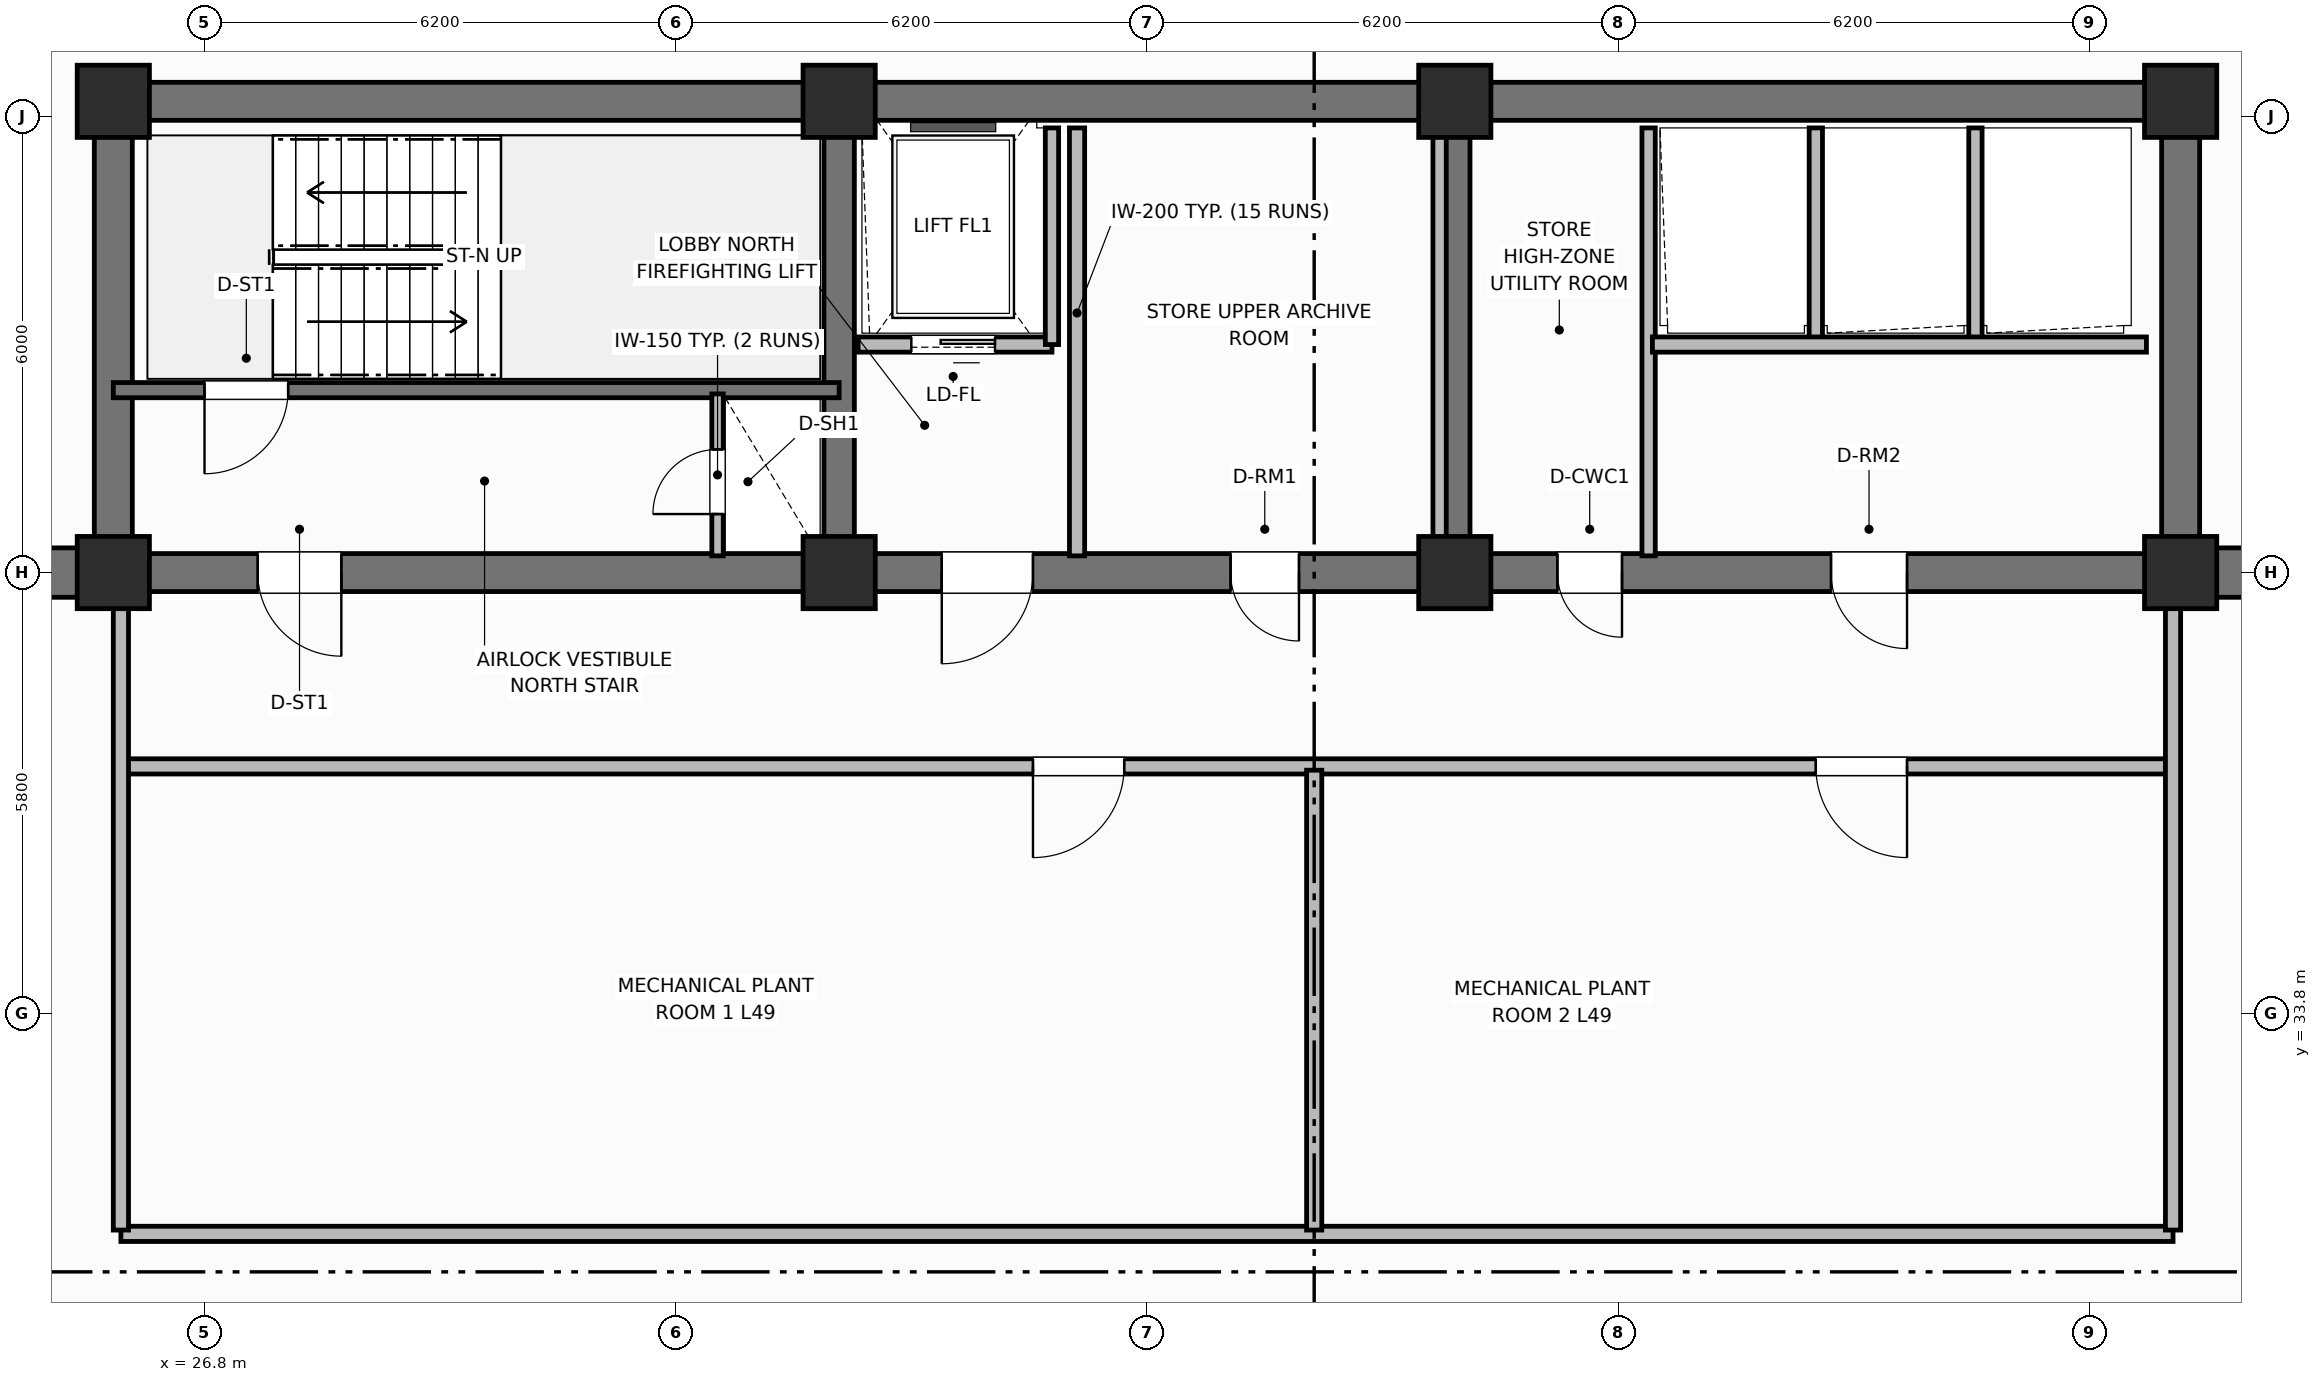
"""IFC4 building model, lengths in metres.
Left out: names, types, materials, properties, quantities, classifications, styles, units other than length and angle.
Written with IfcOpenShell. Run it as: python <this file> out.ifc"""

import sys

from ifc_helpers import new_model, si_unit, direction, frame, frame_2d, origin, origin_2d, place, context, subcontext, project, spatial, rectangle, extrude, element, fill, save


model = new_model("IFC4")
c1 = context("Model", 3, precision=1e-05, world=origin(), true_north=direction((0.0, 1.0)))
c2 = subcontext(c1, "Body", "Model", "MODEL_VIEW")
j1 = project(units=[si_unit("LENGTHUNIT", "METRE"), si_unit("PLANEANGLEUNIT", "RADIAN")], contexts=[c1])
p1 = place(None, origin())
s1 = spatial("IfcSite", under=j1, at=p1, CompositionType="ELEMENT")
p2 = place(p1, origin())
s2 = spatial("IfcBuilding", under=s1, at=p2, CompositionType="ELEMENT")
p3 = place(p2, frame((0.0, 0.0, 195.9)))
s3 = spatial("IfcBuildingStorey", under=s2, at=p3, CompositionType="ELEMENT", Elevation=195.9)
p4 = place(p3, frame((25.6, 45.8, 0.0), z_axis=(0.0, 0.0, 1.0), x_axis=(1.0, 0.0, 0.0)))
e1 = element("IfcWall", 1, at=p4, inside=s3, PredefinedType="SHEAR", context=c2, shape_type="SweptSolid", body=[
    extrude(rectangle(XDim=27.2, YDim=0.5, at=frame_2d((13.6, 0.0))), origin(), (0.0, 0.0, 1.0), 7.2),
])
for number, where, z_axis, x_axis in (
    (2, (25.6, 39.85, 0.0), (0.0, 0.0, 1.0), (0.0, 1.0, 0.0)),
    (3, (52.8, 39.85, 0.0), (0.0, 0.0, 1.0), (0.0, 1.0, 0.0)),
):
    element("IfcWall", number, at=place(p3, frame(where, z_axis=z_axis, x_axis=x_axis)), inside=s3, PredefinedType="SHEAR", context=c2, shape_type="SweptSolid", body=[
        extrude(rectangle(XDim=5.7, YDim=0.5, at=frame_2d((2.85, 0.0))), origin(), (0.0, 0.0, 1.0), 7.2),
    ])
p5 = place(p3, frame((52.8, 39.6, 0.0), z_axis=(0.0, 0.0, 1.0), x_axis=(-1.0, 0.0, 0.0)))
e4 = element("IfcWall", 4, at=p5, inside=s3, PredefinedType="SHEAR", context=c2, shape_type="SweptSolid", body=[
    extrude(rectangle(XDim=27.2, YDim=0.5, at=frame_2d((13.6, 0.0))), origin(), (0.0, 0.0, 1.0), 7.2),
])
p6 = place(p5, frame((24.2, 0.0, 0.0)))
e5 = element("IfcOpeningElement", 5, at=p6, cuts=e4, PredefinedType="OPENING", context=c2, shape_type="SweptSolid", body=[
    extrude(rectangle(XDim=1.1, YDim=2.15, at=frame_2d((0.55, 1.075))), frame((0.0, 0.26, 0.0), z_axis=(0.0, -1.0, 0.0), x_axis=(1.0, 0.0, 0.0)), (0.0, 0.0, 1.0), 0.52),
])
p7 = place(p5, frame((15.1, 0.0, 0.0)))
e6 = element("IfcOpeningElement", 6, at=p7, cuts=e4, PredefinedType="OPENING", context=c2, shape_type="SweptSolid", body=[
    extrude(rectangle(XDim=1.2, YDim=2.15, at=frame_2d((0.6, 1.075))), frame((0.0, 0.26, 0.0), z_axis=(0.0, -1.0, 0.0), x_axis=(1.0, 0.0, 0.0)), (0.0, 0.0, 1.0), 0.52),
])
p8 = place(p5, frame((11.6, 0.0, 0.0)))
e7 = element("IfcOpeningElement", 7, at=p8, cuts=e4, PredefinedType="OPENING", context=c2, shape_type="SweptSolid", body=[
    extrude(rectangle(XDim=0.9, YDim=2.1, at=frame_2d((0.45, 1.05))), frame((0.0, 0.26, 0.0), z_axis=(0.0, -1.0, 0.0), x_axis=(1.0, 0.0, 0.0)), (0.0, 0.0, 1.0), 0.52),
])
p9 = place(p5, frame((7.35, 0.0, 0.0)))
e8 = element("IfcOpeningElement", 8, at=p9, cuts=e4, PredefinedType="OPENING", context=c2, shape_type="SweptSolid", body=[
    extrude(rectangle(XDim=0.85, YDim=2.1, at=frame_2d((0.425, 1.05))), frame((0.0, 0.26, 0.0), z_axis=(0.0, -1.0, 0.0), x_axis=(1.0, 0.0, 0.0)), (0.0, 0.0, 1.0), 0.52),
])
p10 = place(p5, frame((3.6, 0.0, 0.0)))
e9 = element("IfcOpeningElement", 9, at=p10, cuts=e4, PredefinedType="OPENING", context=c2, shape_type="SweptSolid", body=[
    extrude(rectangle(XDim=1.0, YDim=2.15, at=frame_2d((0.5, 1.075))), frame((0.0, 0.26, 0.0), z_axis=(0.0, -1.0, 0.0), x_axis=(1.0, 0.0, 0.0)), (0.0, 0.0, 1.0), 0.52),
])
for number, where, z_axis, x_axis in (
    (10, (35.15, 39.85, 0.0), (0.0, 0.0, 1.0), (0.0, 1.0, 0.0)),
    (11, (43.25, 39.85, 0.0), (0.0, 0.0, 1.0), (0.0, 1.0, 0.0)),
):
    element("IfcWall", number, at=place(p3, frame(where, z_axis=z_axis, x_axis=x_axis)), inside=s3, PredefinedType="SHEAR", context=c2, shape_type="SweptSolid", body=[
        extrude(rectangle(XDim=5.7, YDim=0.4, at=frame_2d((2.85, 0.0))), origin(), (0.0, 0.0, 1.0), 7.2),
    ])
for number, where, z_axis, x_axis in (
    (12, (25.6, 39.6, 0.0), (0.0, 0.0, 1.0), (1.0, 0.0, 0.0)),
    (13, (25.6, 45.8, 0.0), (0.0, 0.0, 1.0), (1.0, 0.0, 0.0)),
    (14, (35.15, 39.6, 0.0), (0.0, 0.0, 1.0), (1.0, 0.0, 0.0)),
    (15, (35.15, 45.8, 0.0), (0.0, 0.0, 1.0), (1.0, 0.0, 0.0)),
    (16, (43.25, 39.6, 0.0), (0.0, 0.0, 1.0), (1.0, 0.0, 0.0)),
    (17, (43.25, 45.8, 0.0), (0.0, 0.0, 1.0), (1.0, 0.0, 0.0)),
    (18, (52.8, 39.6, 0.0), (0.0, 0.0, 1.0), (1.0, 0.0, 0.0)),
    (19, (52.8, 45.8, 0.0), (0.0, 0.0, 1.0), (1.0, 0.0, 0.0)),
):
    element("IfcColumn", number, at=place(p3, frame(where, z_axis=z_axis, x_axis=x_axis)), inside=s3, PredefinedType="COLUMN", context=c2, shape_type="SweptSolid", body=[
        extrude(rectangle(XDim=0.95, YDim=0.95, at=origin_2d()), origin(), (0.0, 0.0, 1.0), 7.2),
    ])
for number, where, z_axis, x_axis in (
    (20, (17.05, 39.6, 0.0), (0.0, 0.0, 1.0), (1.0, 0.0, 0.0)),
    (21, (52.8, 39.6, 0.0), (0.0, 0.0, 1.0), (1.0, 0.0, 0.0)),
):
    element("IfcWall", number, at=place(p3, frame(where, z_axis=z_axis, x_axis=x_axis)), inside=s3, PredefinedType="SHEAR", context=c2, shape_type="SweptSolid", body=[
        extrude(rectangle(XDim=8.55, YDim=0.65, at=frame_2d((4.275, 0.0))), origin(), (0.0, 0.0, 1.0), 6.94),
    ])
p11 = place(p3, frame((35.15, 42.0, 0.0), z_axis=(0.0, 0.0, 1.0), x_axis=(-1.0, 0.0, 0.0)))
e22 = element("IfcWall", 22, at=p11, inside=s3, PredefinedType="SHEAR", context=c2, shape_type="SweptSolid", body=[
    extrude(rectangle(XDim=9.55, YDim=0.2, at=frame_2d((4.775, 0.0))), origin(), (0.0, 0.0, 1.0), 7.2),
])
p12 = place(p11, frame((7.25, 0.0, 0.0)))
e23 = element("IfcOpeningElement", 23, at=p12, cuts=e22, PredefinedType="OPENING", context=c2, shape_type="SweptSolid", body=[
    extrude(rectangle(XDim=1.1, YDim=2.15, at=frame_2d((0.55, 1.075))), frame((0.0, 0.11, 0.0), z_axis=(0.0, -1.0, 0.0), x_axis=(1.0, 0.0, 0.0)), (0.0, 0.0, 1.0), 0.22),
])
p13 = place(p3, frame((33.55, 39.82, 0.0), z_axis=(0.0, 0.0, 1.0), x_axis=(0.0, 1.0, 0.0)))
e24 = element("IfcWall", 24, at=p13, inside=s3, PredefinedType="PARTITIONING", context=c2, shape_type="SweptSolid", body=[
    extrude(rectangle(XDim=2.13, YDim=0.15, at=frame_2d((1.065, 0.0))), origin(), (0.0, 0.0, 1.0), 6.0),
])
p14 = place(p13, frame((0.55, 0.0, 0.0)))
e25 = element("IfcOpeningElement", 25, at=p14, cuts=e24, PredefinedType="OPENING", context=c2, shape_type="SweptSolid", body=[
    extrude(rectangle(XDim=0.85, YDim=2.05, at=frame_2d((0.425, 1.025))), frame((0.0, 0.085, 0.0), z_axis=(0.0, -1.0, 0.0), x_axis=(1.0, 0.0, 0.0)), (0.0, 0.0, 1.0), 0.17),
])
p15 = place(p3, frame((37.95, 42.6, 0.0), z_axis=(0.0, 0.0, 1.0), x_axis=(-1.0, 0.0, 0.0)))
e26 = element("IfcWall", 26, at=p15, inside=s3, PredefinedType="PARTITIONING", context=c2, shape_type="SweptSolid", body=[
    extrude(rectangle(XDim=2.55, YDim=0.2, at=frame_2d((1.275, 0.0))), origin(), (0.0, 0.0, 1.0), 5.82),
])
p16 = place(p15, frame((0.75, 0.0, 0.0)))
e27 = element("IfcOpeningElement", 27, at=p16, cuts=e26, PredefinedType="OPENING", context=c2, shape_type="SweptSolid", body=[
    extrude(rectangle(XDim=1.1, YDim=2.15, at=frame_2d((0.55, 1.075))), frame((0.0, 0.11, 0.0), z_axis=(0.0, -1.0, 0.0), x_axis=(1.0, 0.0, 0.0)), (0.0, 0.0, 1.0), 0.22),
])
p17 = place(p3, frame((37.95, 42.6, 0.0), z_axis=(0.0, 0.0, 1.0), x_axis=(0.0, 1.0, 0.0)))
e28 = element("IfcWall", 28, at=p17, inside=s3, PredefinedType="PARTITIONING", context=c2, shape_type="SweptSolid", body=[
    extrude(rectangle(XDim=2.85, YDim=0.175, at=frame_2d((1.425, 0.0))), origin(), (0.0, 0.0, 1.0), 6.0),
])
p18 = place(p3, frame((38.28, 39.82, 0.0), z_axis=(0.0, 0.0, 1.0), x_axis=(0.0, 1.0, 0.0)))
e29 = element("IfcWall", 29, at=p18, inside=s3, PredefinedType="PARTITIONING", context=c2, shape_type="SweptSolid", body=[
    extrude(rectangle(XDim=5.63, YDim=0.2, at=frame_2d((2.815, 0.0))), origin(), (0.0, 0.0, 1.0), 6.0),
])
for number, where, z_axis, x_axis in (
    (30, (43.05, 39.82, 0.0), (0.0, 0.0, 1.0), (0.0, 1.0, 0.0)),
    (31, (45.8, 39.82, 0.0), (0.0, 0.0, 1.0), (0.0, 1.0, 0.0)),
):
    element("IfcWall", number, at=place(p3, frame(where, z_axis=z_axis, x_axis=x_axis)), inside=s3, PredefinedType="PARTITIONING", context=c2, shape_type="SweptSolid", body=[
        extrude(rectangle(XDim=5.63, YDim=0.175, at=frame_2d((2.815, 0.0))), origin(), (0.0, 0.0, 1.0), 6.0),
    ])
for number, where, z_axis, x_axis in (
    (32, (48.0, 42.65, 0.0), (0.0, 0.0, 1.0), (0.0, 1.0, 0.0)),
    (33, (50.1, 42.65, 0.0), (0.0, 0.0, 1.0), (0.0, 1.0, 0.0)),
):
    element("IfcWall", number, at=place(p3, frame(where, z_axis=z_axis, x_axis=x_axis)), inside=s3, PredefinedType="PARTITIONING", context=c2, shape_type="SweptSolid", body=[
        extrude(rectangle(XDim=2.8, YDim=0.175, at=frame_2d((1.4, 0.0))), origin(), (0.0, 0.0, 1.0), 6.0),
    ])
p19 = place(p3, frame((52.35, 42.6, 0.0), z_axis=(0.0, 0.0, 1.0), x_axis=(-1.0, 0.0, 0.0)))
e34 = element("IfcWall", 34, at=p19, inside=s3, PredefinedType="PARTITIONING", context=c2, shape_type="SweptSolid", body=[
    extrude(rectangle(XDim=6.5, YDim=0.2, at=frame_2d((3.25, 0.0))), origin(), (0.0, 0.0, 1.0), 6.0),
])
p20 = place(p3, frame((52.7, 37.05, 0.0), z_axis=(0.0, 0.0, 1.0), x_axis=(-1.0, 0.0, 0.0)))
e35 = element("IfcWall", 35, at=p20, inside=s3, PredefinedType="PARTITIONING", context=c2, shape_type="SweptSolid", body=[
    extrude(rectangle(XDim=27.0, YDim=0.2, at=frame_2d((13.5, 0.0))), origin(), (0.0, 0.0, 1.0), 6.0),
])
p21 = place(p20, frame((3.5, 0.0, 0.0)))
e36 = element("IfcOpeningElement", 36, at=p21, cuts=e35, PredefinedType="OPENING", context=c2, shape_type="SweptSolid", body=[
    extrude(rectangle(XDim=1.2, YDim=2.15, at=frame_2d((0.6, 1.075))), frame((0.0, 0.11, 0.0), z_axis=(0.0, -1.0, 0.0), x_axis=(1.0, 0.0, 0.0)), (0.0, 0.0, 1.0), 0.22),
])
p22 = place(p20, frame((13.8, 0.0, 0.0)))
e37 = element("IfcOpeningElement", 37, at=p22, cuts=e35, PredefinedType="OPENING", context=c2, shape_type="SweptSolid", body=[
    extrude(rectangle(XDim=1.2, YDim=2.15, at=frame_2d((0.6, 1.075))), frame((0.0, 0.11, 0.0), z_axis=(0.0, -1.0, 0.0), x_axis=(1.0, 0.0, 0.0)), (0.0, 0.0, 1.0), 0.22),
])
p23 = place(p3, frame((25.7, 30.9, 0.0), z_axis=(0.0, 0.0, 1.0), x_axis=(1.0, 0.0, 0.0)))
e38 = element("IfcWall", 38, at=p23, inside=s3, PredefinedType="PARTITIONING", context=c2, shape_type="SweptSolid", body=[
    extrude(rectangle(XDim=27.0, YDim=0.2, at=frame_2d((13.5, 0.0))), origin(), (0.0, 0.0, 1.0), 6.0),
])
p24 = place(p3, frame((41.4, 30.95, 0.0), z_axis=(0.0, 0.0, 1.0), x_axis=(0.0, 1.0, 0.0)))
e39 = element("IfcWall", 39, at=p24, inside=s3, PredefinedType="PARTITIONING", context=c2, shape_type="SweptSolid", body=[
    extrude(rectangle(XDim=6.05, YDim=0.2, at=frame_2d((3.025, 0.0))), origin(), (0.0, 0.0, 1.0), 6.0),
])
for number, where, z_axis, x_axis in (
    (40, (25.7, 30.95, 0.0), (0.0, 0.0, 1.0), (0.0, 1.0, 0.0)),
    (41, (52.7, 30.95, 0.0), (0.0, 0.0, 1.0), (0.0, 1.0, 0.0)),
):
    element("IfcWall", number, at=place(p3, frame(where, z_axis=z_axis, x_axis=x_axis)), inside=s3, PredefinedType="PARTITIONING", context=c2, shape_type="SweptSolid", body=[
        extrude(rectangle(XDim=8.25, YDim=0.2, at=frame_2d((4.125, 0.0))), origin(), (0.0, 0.0, 1.0), 6.0),
    ])
p25 = place(p12, origin())
e42 = element("IfcDoor", 42, at=p25, inside=s3, OperationType="SINGLE_SWING_RIGHT", PredefinedType="DOOR", context=c2, shape_type="SweptSolid", body=[
    extrude(rectangle(XDim=1.1, YDim=2.15, at=frame_2d((0.55, 1.075))), frame((0.0, 0.025, 0.0), z_axis=(0.0, -1.0, 0.0), x_axis=(1.0, 0.0, 0.0)), (0.0, 0.0, 1.0), 0.05),
])
fill(e23, e42)
p26 = place(p14, origin())
e43 = element("IfcDoor", 43, at=p26, inside=s3, OperationType="SINGLE_SWING_LEFT", PredefinedType="TRAPDOOR", context=c2, shape_type="SweptSolid", body=[
    extrude(rectangle(XDim=0.85, YDim=2.05, at=frame_2d((0.425, 1.025))), frame((0.0, 0.025, 0.0), z_axis=(0.0, -1.0, 0.0), x_axis=(1.0, 0.0, 0.0)), (0.0, 0.0, 1.0), 0.05),
])
fill(e25, e43)
p27 = place(p16, origin())
e44 = element("IfcDoor", 44, at=p27, inside=s3, OperationType="SLIDING_TO_LEFT", PredefinedType="DOOR", context=c2, shape_type="SweptSolid", body=[
    extrude(rectangle(XDim=1.1, YDim=2.15, at=frame_2d((0.55, 1.075))), frame((0.0, 0.025, 0.0), z_axis=(0.0, -1.0, 0.0), x_axis=(1.0, 0.0, 0.0)), (0.0, 0.0, 1.0), 0.05),
])
fill(e27, e44)
p28 = place(p21, origin())
e45 = element("IfcDoor", 45, at=p28, inside=s3, OperationType="SINGLE_SWING_LEFT", PredefinedType="DOOR", context=c2, shape_type="SweptSolid", body=[
    extrude(rectangle(XDim=1.2, YDim=2.15, at=frame_2d((0.6, 1.075))), frame((0.0, 0.025, 0.0), z_axis=(0.0, -1.0, 0.0), x_axis=(1.0, 0.0, 0.0)), (0.0, 0.0, 1.0), 0.05),
])
fill(e36, e45)
p29 = place(p22, origin())
e46 = element("IfcDoor", 46, at=p29, inside=s3, OperationType="SINGLE_SWING_RIGHT", PredefinedType="DOOR", context=c2, shape_type="SweptSolid", body=[
    extrude(rectangle(XDim=1.2, YDim=2.15, at=frame_2d((0.6, 1.075))), frame((0.0, 0.025, 0.0), z_axis=(0.0, -1.0, 0.0), x_axis=(1.0, 0.0, 0.0)), (0.0, 0.0, 1.0), 0.05),
])
fill(e37, e46)
p30 = place(p6, origin())
e47 = element("IfcDoor", 47, at=p30, inside=s3, OperationType="SINGLE_SWING_LEFT", PredefinedType="DOOR", context=c2, shape_type="SweptSolid", body=[
    extrude(rectangle(XDim=1.1, YDim=2.15, at=frame_2d((0.55, 1.075))), frame((0.0, 0.025, 0.0), z_axis=(0.0, -1.0, 0.0), x_axis=(1.0, 0.0, 0.0)), (0.0, 0.0, 1.0), 0.05),
])
fill(e5, e47)
p31 = place(p7, origin())
e48 = element("IfcDoor", 48, at=p31, inside=s3, OperationType="SINGLE_SWING_RIGHT", PredefinedType="DOOR", context=c2, shape_type="SweptSolid", body=[
    extrude(rectangle(XDim=1.2, YDim=2.15, at=frame_2d((0.6, 1.075))), frame((0.0, 0.025, 0.0), z_axis=(0.0, -1.0, 0.0), x_axis=(1.0, 0.0, 0.0)), (0.0, 0.0, 1.0), 0.05),
])
fill(e6, e48)
p32 = place(p8, origin())
e49 = element("IfcDoor", 49, at=p32, inside=s3, OperationType="SINGLE_SWING_LEFT", PredefinedType="DOOR", context=c2, shape_type="SweptSolid", body=[
    extrude(rectangle(XDim=0.9, YDim=2.1, at=frame_2d((0.45, 1.05))), frame((0.0, 0.025, 0.0), z_axis=(0.0, -1.0, 0.0), x_axis=(1.0, 0.0, 0.0)), (0.0, 0.0, 1.0), 0.05),
])
fill(e7, e49)
p33 = place(p9, origin())
e50 = element("IfcDoor", 50, at=p33, inside=s3, OperationType="SINGLE_SWING_LEFT", PredefinedType="DOOR", context=c2, shape_type="SweptSolid", body=[
    extrude(rectangle(XDim=0.85, YDim=2.1, at=frame_2d((0.425, 1.05))), frame((0.0, 0.025, 0.0), z_axis=(0.0, -1.0, 0.0), x_axis=(1.0, 0.0, 0.0)), (0.0, 0.0, 1.0), 0.05),
])
fill(e8, e50)
p34 = place(p10, origin())
e51 = element("IfcDoor", 51, at=p34, inside=s3, OperationType="SINGLE_SWING_LEFT", PredefinedType="DOOR", context=c2, shape_type="SweptSolid", body=[
    extrude(rectangle(XDim=1.0, YDim=2.15, at=frame_2d((0.5, 1.075))), frame((0.0, 0.025, 0.0), z_axis=(0.0, -1.0, 0.0), x_axis=(1.0, 0.0, 0.0)), (0.0, 0.0, 1.0), 0.05),
])
fill(e9, e51)
save(model, sys.argv[1])
